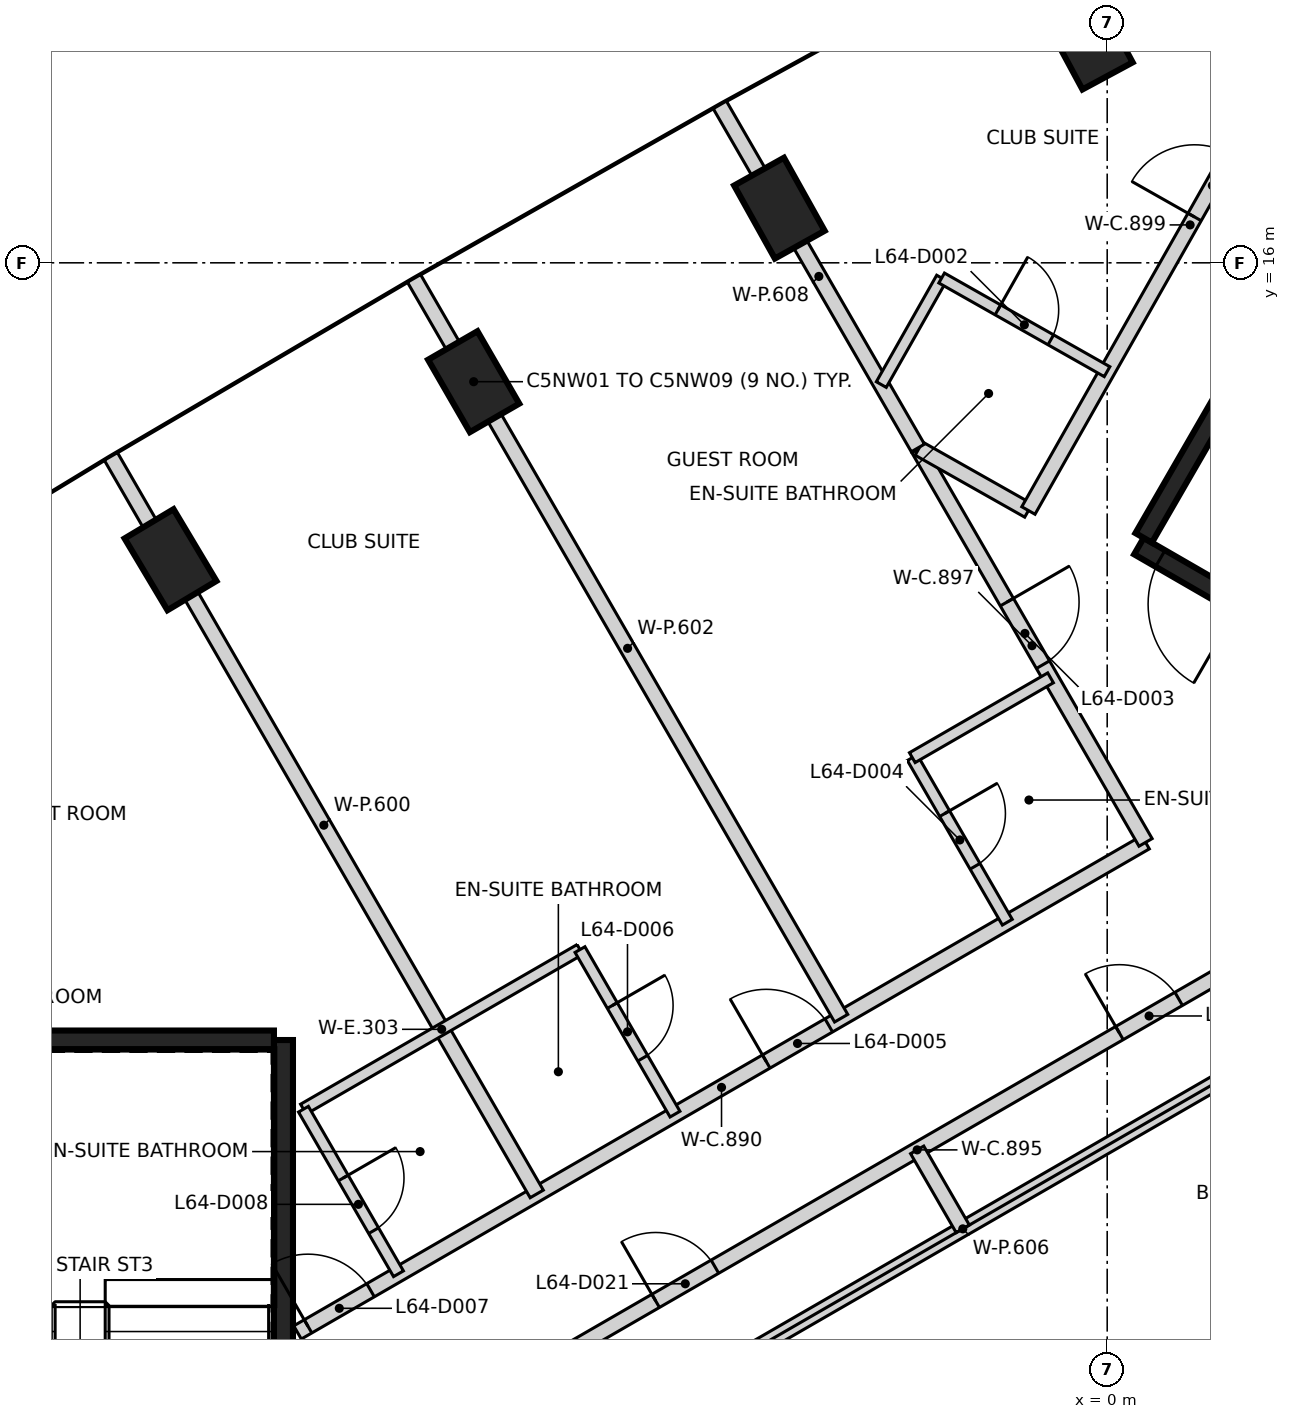
"""IFC4 building model, lengths in metres.
Left out: names, types, materials, properties, quantities, classifications, styles, units other than length and angle.
Written with IfcOpenShell. Run it as: python <this file> out.ifc"""

import sys

from ifc_helpers import new_model, si_unit, direction, frame, frame_2d, origin, origin_2d, place, context, subcontext, project, spatial, rectangle, extrude, element, fill, save


model = new_model("IFC4")
c1 = context("Model", 3, precision=1e-05, world=origin(), true_north=direction((0.0, 1.0)))
c2 = subcontext(c1, "Body", "Model", "MODEL_VIEW")
j1 = project(units=[si_unit("LENGTHUNIT", "METRE"), si_unit("PLANEANGLEUNIT", "RADIAN")], contexts=[c1])
p1 = place(None, origin())
s1 = spatial("IfcSite", under=j1, at=p1, CompositionType="ELEMENT")
p2 = place(p1, origin())
s2 = spatial("IfcBuilding", under=s1, at=p2, CompositionType="ELEMENT")
p3 = place(p2, frame((0.0, 0.0, 253.8)))
s3 = spatial("IfcBuildingStorey", under=s2, at=p3, CompositionType="ELEMENT", Elevation=253.8)
for number, where, z_axis, x_axis in (
    (1, (-0.256, 18.943, -0.35), (0.0, 0.0, 1.0), (-0.475, 0.88, 0.0)),
    (2, (-4.312, 16.719, -0.35), (0.0, 0.0, 1.0), (-0.487, 0.873, 0.0)),
    (3, (-8.335, 14.436, -0.35), (0.0, 0.0, 1.0), (-0.5, 0.866, 0.0)),
    (4, (-12.323, 12.094, -0.35), (0.0, 0.0, 1.0), (-0.513, 0.858, 0.0)),
):
    element("IfcColumn", number, at=place(p3, frame(where, z_axis=z_axis, x_axis=x_axis)), inside=s3, PredefinedType="COLUMN", context=c2, shape_type="SweptSolid", body=[
        extrude(rectangle(XDim=1.1, YDim=0.75, at=origin_2d()), origin(), (0.0, 0.0, 1.0), 2.64),
    ])
p4 = place(p3, frame((-10.837, 5.775, 0.0), z_axis=(0.0, 0.0, 1.0), x_axis=(0.0, -1.0, 0.0)))
e5 = element("IfcWall", 5, at=p4, inside=s3, PredefinedType="SHEAR", context=c2, shape_type="SweptSolid", body=[
    extrude(rectangle(XDim=11.55, YDim=0.25, at=frame_2d((5.775, 0.0))), origin(), (0.0, 0.0, 1.0), 3.2),
])
p5 = place(p4, frame((10.025, 0.0, 0.0)))
e6 = element("IfcOpeningElement", 6, at=p5, cuts=e5, PredefinedType="OPENING", context=c2, shape_type="SweptSolid", body=[
    extrude(rectangle(XDim=1.2, YDim=2.1, at=frame_2d((0.6, 1.05))), frame((0.0, 0.135, 0.0), z_axis=(0.0, -1.0, 0.0), x_axis=(1.0, 0.0, 0.0)), (0.0, 0.0, 1.0), 0.27),
])
p6 = place(p4, frame((8.725, 0.0, 0.0)))
e7 = element("IfcOpeningElement", 7, at=p6, cuts=e5, PredefinedType="OPENING", context=c2, shape_type="SweptSolid", body=[
    extrude(rectangle(XDim=1.2, YDim=2.1, at=frame_2d((0.6, 1.05))), frame((0.0, 0.135, 0.0), z_axis=(0.0, -1.0, 0.0), x_axis=(1.0, 0.0, 0.0)), (0.0, 0.0, 1.0), 0.27),
])
p7 = place(p3, frame((-16.472, 5.775, 0.0), z_axis=(0.0, 0.0, 1.0), x_axis=(1.0, 0.0, 0.0)))
e8 = element("IfcWall", 8, at=p7, inside=s3, PredefinedType="SHEAR", context=c2, shape_type="SweptSolid", body=[
    extrude(rectangle(XDim=5.51, YDim=0.25, at=frame_2d((2.755, 0.0))), origin(), (0.0, 0.0, 1.0), 3.2),
])
p8 = place(p3, frame((10.42, 6.498, 0.0), z_axis=(0.0, 0.0, 1.0), x_axis=(-0.866021906294, 0.500006057782, 0.0)))
e9 = element("IfcWall", 9, at=p8, inside=s3, PredefinedType="SHEAR", context=c2, shape_type="SweptSolid", body=[
    extrude(rectangle(XDim=11.55, YDim=0.25, at=frame_2d((5.775, 0.0))), origin(), (0.0, 0.0, 1.0), 3.2),
])
p9 = place(p8, frame((10.025, 0.0, 0.0)))
e10 = element("IfcOpeningElement", 10, at=p9, cuts=e9, PredefinedType="OPENING", context=c2, shape_type="SweptSolid", body=[
    extrude(rectangle(XDim=1.2, YDim=2.1, at=frame_2d((0.6, 1.05))), frame((0.0, 0.135, 0.0), z_axis=(0.0, -1.0, 0.0), x_axis=(1.0, 0.0, 0.0)), (0.0, 0.0, 1.0), 0.27),
])
p10 = place(p8, frame((8.725, 0.0, 0.0)))
e11 = element("IfcOpeningElement", 11, at=p10, cuts=e9, PredefinedType="OPENING", context=c2, shape_type="SweptSolid", body=[
    extrude(rectangle(XDim=1.2, YDim=2.1, at=frame_2d((0.6, 1.05))), frame((0.0, 0.135, 0.0), z_axis=(0.0, -1.0, 0.0), x_axis=(1.0, 0.0, 0.0)), (0.0, 0.0, 1.0), 0.27),
])
p11 = place(p3, frame((0.48, 12.381, 0.0), z_axis=(0.0, 0.0, 1.0), x_axis=(0.49999885962, 0.866026062182, 0.0)))
e12 = element("IfcWall", 12, at=p11, inside=s3, PredefinedType="SHEAR", context=c2, shape_type="SweptSolid", body=[
    extrude(rectangle(XDim=5.225, YDim=0.25, at=frame_2d((2.612, 0.0))), origin(), (0.0, 0.0, 1.0), 3.2),
])
p12 = place(p3, frame((-10.652, 1.928, 0.0), z_axis=(0.0, 0.0, 1.0), x_axis=(0.865793573301, 0.500401327367, 0.0)))
e13 = element("IfcWall", 13, at=p12, inside=s3, PredefinedType="PARTITIONING", context=c2, shape_type="SweptSolid", body=[
    extrude(rectangle(XDim=12.886, YDim=0.2, at=frame_2d((6.443, 0.0))), origin(), (0.0, 0.0, 1.0), 3.2),
])
p13 = place(p12, frame((7.123, 0.0, 0.0)))
e14 = element("IfcOpeningElement", 14, at=p13, cuts=e13, PredefinedType="OPENING", context=c2, shape_type="SweptSolid", body=[
    extrude(rectangle(XDim=0.95, YDim=2.1, at=frame_2d((0.475, 1.05))), frame((0.0, 0.11, 0.0), z_axis=(0.0, -1.0, 0.0), x_axis=(1.0, 0.0, 0.0)), (0.0, 0.0, 1.0), 0.22),
])
p14 = place(p12, frame((0.16, 0.0, 0.0)))
e15 = element("IfcOpeningElement", 15, at=p14, cuts=e13, PredefinedType="OPENING", context=c2, shape_type="SweptSolid", body=[
    extrude(rectangle(XDim=0.95, YDim=2.1, at=frame_2d((0.475, 1.05))), frame((0.0, 0.11, 0.0), z_axis=(0.0, -1.0, 0.0), x_axis=(1.0, 0.0, 0.0)), (0.0, 0.0, 1.0), 0.22),
])
p15 = place(p3, frame((-8.612, 0.801, 0.0), z_axis=(0.0, 0.0, 1.0), x_axis=(0.866005560651, 0.500034367741, 0.0)))
e16 = element("IfcWall", 16, at=p15, inside=s3, PredefinedType="PARTITIONING", context=c2, shape_type="SweptSolid", body=[
    extrude(rectangle(XDim=14.115, YDim=0.2, at=frame_2d((7.058, 0.0))), origin(), (0.0, 0.0, 1.0), 3.2),
])
p16 = place(p15, frame((10.131, 0.0, 0.0)))
e17 = element("IfcOpeningElement", 17, at=p16, cuts=e16, PredefinedType="OPENING", context=c2, shape_type="SweptSolid", body=[
    extrude(rectangle(XDim=0.9, YDim=2.1, at=frame_2d((0.45, 1.05))), frame((0.0, 0.11, 0.0), z_axis=(0.0, -1.0, 0.0), x_axis=(1.0, 0.0, 0.0)), (0.0, 0.0, 1.0), 0.22),
])
p17 = place(p15, frame((3.085, 0.0, 0.0)))
e18 = element("IfcOpeningElement", 18, at=p17, cuts=e16, PredefinedType="OPENING", context=c2, shape_type="SweptSolid", body=[
    extrude(rectangle(XDim=0.9, YDim=2.1, at=frame_2d((0.45, 1.05))), frame((0.0, 0.11, 0.0), z_axis=(0.0, -1.0, 0.0), x_axis=(1.0, 0.0, 0.0)), (0.0, 0.0, 1.0), 0.22),
])
p18 = place(p3, frame((-2.483, 13.551, 0.0), z_axis=(0.0, 0.0, 1.0), x_axis=(0.499878046143, -0.866095802429, 0.0)))
e19 = element("IfcWall", 19, at=p18, inside=s3, PredefinedType="PARTITIONING", context=c2, shape_type="SweptSolid", body=[
    extrude(rectangle(XDim=5.977, YDim=0.2, at=frame_2d((2.988, 0.0))), origin(), (0.0, 0.0, 1.0), 3.2),
])
p19 = place(p18, frame((2.327, 0.0, 0.0)))
e20 = element("IfcOpeningElement", 20, at=p19, cuts=e19, PredefinedType="OPENING", context=c2, shape_type="SweptSolid", body=[
    extrude(rectangle(XDim=0.95, YDim=2.1, at=frame_2d((0.475, 1.05))), frame((0.0, 0.11, 0.0), z_axis=(0.0, -1.0, 0.0), x_axis=(1.0, 0.0, 0.0)), (0.0, 0.0, 1.0), 0.22),
])
p20 = place(p3, frame((-2.478, 13.556, 0.0), z_axis=(0.0, 0.0, 1.0), x_axis=(0.870609500021, -0.491974692919, 0.0)))
e21 = element("IfcWall", 21, at=p20, inside=s3, PredefinedType="PARTITIONING", context=c2, shape_type="SweptSolid", body=[
    extrude(rectangle(XDim=1.656, YDim=0.2, at=frame_2d((0.828, 0.0))), origin(), (0.0, 0.0, 1.0), 3.2),
])
p21 = place(p3, frame((-1.037, 12.741, 0.0), z_axis=(0.0, 0.0, 1.0), x_axis=(0.492679417867, 0.870210888929, 0.0)))
e22 = element("IfcWall", 22, at=p21, inside=s3, PredefinedType="PARTITIONING", context=c2, shape_type="SweptSolid", body=[
    extrude(rectangle(XDim=8.636, YDim=0.2, at=frame_2d((4.318, 0.0))), origin(), (0.0, 0.0, 1.0), 3.2),
])
p22 = place(p21, frame((4.438, 0.0, 0.0)))
e23 = element("IfcOpeningElement", 23, at=p22, cuts=e22, PredefinedType="OPENING", context=c2, shape_type="SweptSolid", body=[
    extrude(rectangle(XDim=0.95, YDim=2.1, at=frame_2d((0.475, 1.05))), frame((0.0, 0.11, 0.0), z_axis=(0.0, -1.0, 0.0), x_axis=(1.0, 0.0, 0.0)), (0.0, 0.0, 1.0), 0.22),
])
p23 = place(p3, frame((-13.107, 13.453, 0.0), z_axis=(0.0, 0.0, 1.0), x_axis=(0.50003870279, -0.866003057565, 0.0)))
e24 = element("IfcWall", 24, at=p23, inside=s3, PredefinedType="PARTITIONING", context=c2, shape_type="SweptSolid", body=[
    extrude(rectangle(XDim=11.204, YDim=0.2, at=frame_2d((5.602, 0.0))), origin(), (0.0, 0.0, 1.0), 3.2),
])
p24 = place(p3, frame((-9.119, 15.795, 0.0), z_axis=(0.0, 0.0, 1.0), x_axis=(0.500015176972, -0.866016641178, 0.0)))
e25 = element("IfcWall", 25, at=p24, inside=s3, PredefinedType="PARTITIONING", context=c2, shape_type="SweptSolid", body=[
    extrude(rectangle(XDim=11.239, YDim=0.2, at=frame_2d((5.619, 0.0))), origin(), (0.0, 0.0, 1.0), 3.2),
])
p25 = place(p3, frame((-6.0, 0.924, 0.0), z_axis=(0.0, 0.0, 1.0), x_axis=(0.866012967051, 0.500021540435, 0.0)))
e26 = element("IfcWall", 26, at=p25, inside=s3, PredefinedType="PARTITIONING", context=c2, shape_type="SweptSolid", body=[
    extrude(rectangle(XDim=9.468, YDim=0.2, at=frame_2d((4.734, 0.0))), origin(), (0.0, 0.0, 1.0), 3.2),
])
p26 = place(p3, frame((-5.097, 18.078, 0.0), z_axis=(0.0, 0.0, 1.0), x_axis=(0.499977898262, -0.866038163853, 0.0)))
e27 = element("IfcWall", 27, at=p26, inside=s3, PredefinedType="PARTITIONING", context=c2, shape_type="SweptSolid", body=[
    extrude(rectangle(XDim=5.212, YDim=0.2, at=frame_2d((2.606, 0.0))), origin(), (0.0, 0.0, 1.0), 3.2),
])
p27 = place(p3, frame((-2.5, 4.33, 0.0), z_axis=(0.0, 0.0, 1.0), x_axis=(0.499969057507, -0.866043267704, 0.0)))
e28 = element("IfcWall", 28, at=p27, inside=s3, PredefinedType="PARTITIONING", context=c2, shape_type="SweptSolid", body=[
    extrude(rectangle(XDim=1.2, YDim=0.2, at=frame_2d((0.6, 0.0))), origin(), (0.0, 0.0, 1.0), 3.2),
])
p28 = place(p3, frame((-10.574, 4.866, 0.0), z_axis=(0.0, 0.0, 1.0), x_axis=(0.866052994476, 0.499952208475, 0.0)))
e29 = element("IfcWall", 29, at=p28, inside=s3, PredefinedType="PARTITIONING", context=c2, shape_type="SweptSolid", body=[
    extrude(rectangle(XDim=4.201, YDim=0.15, at=frame_2d((2.1, 0.0))), origin(), (0.0, 0.0, 1.0), 3.2),
])
p29 = place(p3, frame((-10.574, 4.865, 0.0), z_axis=(0.0, 0.0, 1.0), x_axis=(0.500004234368, -0.866022959057, 0.0)))
e30 = element("IfcWall", 30, at=p29, inside=s3, PredefinedType="PARTITIONING", context=c2, shape_type="SweptSolid", body=[
    extrude(rectangle(XDim=2.5, YDim=0.15, at=frame_2d((1.25, 0.0))), origin(), (0.0, 0.0, 1.0), 3.2),
])
p30 = place(p29, frame((1.045, 0.0, 0.0)))
e31 = element("IfcOpeningElement", 31, at=p30, cuts=e30, PredefinedType="OPENING", context=c2, shape_type="SweptSolid", body=[
    extrude(rectangle(XDim=0.8, YDim=2.1, at=frame_2d((0.4, 1.05))), frame((0.0, 0.085, 0.0), z_axis=(0.0, -1.0, 0.0), x_axis=(1.0, 0.0, 0.0)), (0.0, 0.0, 1.0), 0.17),
])
p31 = place(p3, frame((-6.936, 6.965, 0.0), z_axis=(0.0, 0.0, 1.0), x_axis=(0.500004234368, -0.866022959057, 0.0)))
e32 = element("IfcWall", 32, at=p31, inside=s3, PredefinedType="PARTITIONING", context=c2, shape_type="SweptSolid", body=[
    extrude(rectangle(XDim=2.5, YDim=0.15, at=frame_2d((1.25, 0.0))), origin(), (0.0, 0.0, 1.0), 3.2),
])
p32 = place(p31, frame((0.85, 0.0, 0.0)))
e33 = element("IfcOpeningElement", 33, at=p32, cuts=e32, PredefinedType="OPENING", context=c2, shape_type="SweptSolid", body=[
    extrude(rectangle(XDim=0.8, YDim=2.1, at=frame_2d((0.4, 1.05))), frame((0.0, 0.085, 0.0), z_axis=(0.0, -1.0, 0.0), x_axis=(1.0, 0.0, 0.0)), (0.0, 0.0, 1.0), 0.17),
])
p33 = place(p3, frame((-2.972, 14.398, 0.0), z_axis=(0.0, 0.0, 1.0), x_axis=(0.492741112884, 0.870175956732, 0.0)))
e34 = element("IfcWall", 34, at=p33, inside=s3, PredefinedType="PARTITIONING", context=c2, shape_type="SweptSolid", body=[
    extrude(rectangle(XDim=1.611, YDim=0.15, at=frame_2d((0.806, 0.0))), origin(), (0.0, 0.0, 1.0), 3.2),
])
p34 = place(p3, frame((-2.564, 9.49, 0.0), z_axis=(0.0, 0.0, 1.0), x_axis=(0.500004234368, -0.866022959057, 0.0)))
e35 = element("IfcWall", 35, at=p34, inside=s3, PredefinedType="PARTITIONING", context=c2, shape_type="SweptSolid", body=[
    extrude(rectangle(XDim=2.5, YDim=0.15, at=frame_2d((1.25, 0.0))), origin(), (0.0, 0.0, 1.0), 3.2),
])
p35 = place(p34, frame((0.85, 0.0, 0.0)))
e36 = element("IfcOpeningElement", 36, at=p35, cuts=e35, PredefinedType="OPENING", context=c2, shape_type="SweptSolid", body=[
    extrude(rectangle(XDim=0.8, YDim=2.1, at=frame_2d((0.4, 1.05))), frame((0.0, 0.085, 0.0), z_axis=(0.0, -1.0, 0.0), x_axis=(1.0, 0.0, 0.0)), (0.0, 0.0, 1.0), 0.17),
])
p36 = place(p3, frame((-2.564, 9.49, 0.0), z_axis=(0.0, 0.0, 1.0), x_axis=(0.866038466041, 0.499977374825, 0.0)))
e37 = element("IfcWall", 37, at=p36, inside=s3, PredefinedType="PARTITIONING", context=c2, shape_type="SweptSolid", body=[
    extrude(rectangle(XDim=2.1, YDim=0.15, at=frame_2d((1.05, 0.0))), origin(), (0.0, 0.0, 1.0), 3.2),
])
p37 = place(p3, frame((-2.178, 15.8, 0.0), z_axis=(0.0, 0.0, 1.0), x_axis=(0.870218946292, -0.492665186019, 0.0)))
e38 = element("IfcWall", 38, at=p37, inside=s3, PredefinedType="PARTITIONING", context=c2, shape_type="SweptSolid", body=[
    extrude(rectangle(XDim=2.5, YDim=0.15, at=frame_2d((1.25, 0.0))), origin(), (0.0, 0.0, 1.0), 3.2),
])
p38 = place(p37, frame((0.85, 0.0, 0.0)))
e39 = element("IfcOpeningElement", 39, at=p38, cuts=e38, PredefinedType="OPENING", context=c2, shape_type="SweptSolid", body=[
    extrude(rectangle(XDim=0.8, YDim=2.1, at=frame_2d((0.4, 1.05))), frame((0.0, 0.085, 0.0), z_axis=(0.0, -1.0, 0.0), x_axis=(1.0, 0.0, 0.0)), (0.0, 0.0, 1.0), 0.17),
])
p39 = place(p9, origin())
e40 = element("IfcDoor", 40, at=p39, inside=s3, OperationType="SINGLE_SWING_LEFT", PredefinedType="DOOR", context=c2, shape_type="SweptSolid", body=[
    extrude(rectangle(XDim=1.2, YDim=2.1, at=frame_2d((0.6, 1.05))), frame((0.0, 0.025, 0.0), z_axis=(0.0, -1.0, 0.0), x_axis=(1.0, 0.0, 0.0)), (0.0, 0.0, 1.0), 0.05),
])
fill(e10, e40)
p40 = place(p22, origin())
e41 = element("IfcDoor", 41, at=p40, inside=s3, OperationType="SINGLE_SWING_LEFT", PredefinedType="DOOR", context=c2, shape_type="SweptSolid", body=[
    extrude(rectangle(XDim=0.95, YDim=2.1, at=frame_2d((0.475, 1.05))), frame((0.0, 0.025, 0.0), z_axis=(0.0, -1.0, 0.0), x_axis=(1.0, 0.0, 0.0)), (0.0, 0.0, 1.0), 0.05),
])
fill(e23, e41)
p41 = place(p38, origin())
e42 = element("IfcDoor", 42, at=p41, inside=s3, OperationType="SINGLE_SWING_LEFT", PredefinedType="DOOR", context=c2, shape_type="SweptSolid", body=[
    extrude(rectangle(XDim=0.8, YDim=2.1, at=frame_2d((0.4, 1.05))), frame((0.0, 0.025, 0.0), z_axis=(0.0, -1.0, 0.0), x_axis=(1.0, 0.0, 0.0)), (0.0, 0.0, 1.0), 0.05),
])
fill(e39, e42)
p42 = place(p19, frame((0.95, 0.0, 0.0), z_axis=(0.0, 0.0, 1.0), x_axis=(-1.0, 0.0, 0.0)))
e43 = element("IfcDoor", 43, at=p42, inside=s3, OperationType="SINGLE_SWING_LEFT", PredefinedType="DOOR", context=c2, shape_type="SweptSolid", body=[
    extrude(rectangle(XDim=0.95, YDim=2.1, at=frame_2d((0.475, 1.05))), frame((0.0, 0.025, 0.0), z_axis=(0.0, -1.0, 0.0), x_axis=(1.0, 0.0, 0.0)), (0.0, 0.0, 1.0), 0.05),
])
fill(e20, e43)
p43 = place(p35, frame((0.8, 0.0, 0.0), z_axis=(0.0, 0.0, 1.0), x_axis=(-1.0, 0.0, 0.0)))
e44 = element("IfcDoor", 44, at=p43, inside=s3, OperationType="SINGLE_SWING_LEFT", PredefinedType="DOOR", context=c2, shape_type="SweptSolid", body=[
    extrude(rectangle(XDim=0.8, YDim=2.1, at=frame_2d((0.4, 1.05))), frame((0.0, 0.025, 0.0), z_axis=(0.0, -1.0, 0.0), x_axis=(1.0, 0.0, 0.0)), (0.0, 0.0, 1.0), 0.05),
])
fill(e36, e44)
p44 = place(p13, origin())
e45 = element("IfcDoor", 45, at=p44, inside=s3, OperationType="SINGLE_SWING_LEFT", PredefinedType="DOOR", context=c2, shape_type="SweptSolid", body=[
    extrude(rectangle(XDim=0.95, YDim=2.1, at=frame_2d((0.475, 1.05))), frame((0.0, 0.025, 0.0), z_axis=(0.0, -1.0, 0.0), x_axis=(1.0, 0.0, 0.0)), (0.0, 0.0, 1.0), 0.05),
])
fill(e14, e45)
p45 = place(p32, origin())
e46 = element("IfcDoor", 46, at=p45, inside=s3, OperationType="SINGLE_SWING_LEFT", PredefinedType="DOOR", context=c2, shape_type="SweptSolid", body=[
    extrude(rectangle(XDim=0.8, YDim=2.1, at=frame_2d((0.4, 1.05))), frame((0.0, 0.025, 0.0), z_axis=(0.0, -1.0, 0.0), x_axis=(1.0, 0.0, 0.0)), (0.0, 0.0, 1.0), 0.05),
])
fill(e33, e46)
p46 = place(p14, origin())
e47 = element("IfcDoor", 47, at=p46, inside=s3, OperationType="SINGLE_SWING_LEFT", PredefinedType="DOOR", context=c2, shape_type="SweptSolid", body=[
    extrude(rectangle(XDim=0.95, YDim=2.1, at=frame_2d((0.475, 1.05))), frame((0.0, 0.025, 0.0), z_axis=(0.0, -1.0, 0.0), x_axis=(1.0, 0.0, 0.0)), (0.0, 0.0, 1.0), 0.05),
])
fill(e15, e47)
p47 = place(p30, frame((0.8, 0.0, 0.0), z_axis=(0.0, 0.0, 1.0), x_axis=(-1.0, 0.0, 0.0)))
e48 = element("IfcDoor", 48, at=p47, inside=s3, OperationType="SINGLE_SWING_LEFT", PredefinedType="DOOR", context=c2, shape_type="SweptSolid", body=[
    extrude(rectangle(XDim=0.8, YDim=2.1, at=frame_2d((0.4, 1.05))), frame((0.0, 0.025, 0.0), z_axis=(0.0, -1.0, 0.0), x_axis=(1.0, 0.0, 0.0)), (0.0, 0.0, 1.0), 0.05),
])
fill(e31, e48)
p48 = place(p16, frame((0.9, 0.0, 0.0), z_axis=(0.0, 0.0, 1.0), x_axis=(-1.0, 0.0, 0.0)))
e49 = element("IfcDoor", 49, at=p48, inside=s3, OperationType="SINGLE_SWING_LEFT", PredefinedType="DOOR", context=c2, shape_type="SweptSolid", body=[
    extrude(rectangle(XDim=0.9, YDim=2.1, at=frame_2d((0.45, 1.05))), frame((0.0, 0.025, 0.0), z_axis=(0.0, -1.0, 0.0), x_axis=(1.0, 0.0, 0.0)), (0.0, 0.0, 1.0), 0.05),
])
fill(e17, e49)
p49 = place(p17, frame((0.9, 0.0, 0.0), z_axis=(0.0, 0.0, 1.0), x_axis=(-1.0, 0.0, 0.0)))
e50 = element("IfcDoor", 50, at=p49, inside=s3, OperationType="SINGLE_SWING_LEFT", PredefinedType="DOOR", context=c2, shape_type="SweptSolid", body=[
    extrude(rectangle(XDim=0.9, YDim=2.1, at=frame_2d((0.45, 1.05))), frame((0.0, 0.025, 0.0), z_axis=(0.0, -1.0, 0.0), x_axis=(1.0, 0.0, 0.0)), (0.0, 0.0, 1.0), 0.05),
])
fill(e18, e50)
save(model, sys.argv[1])
